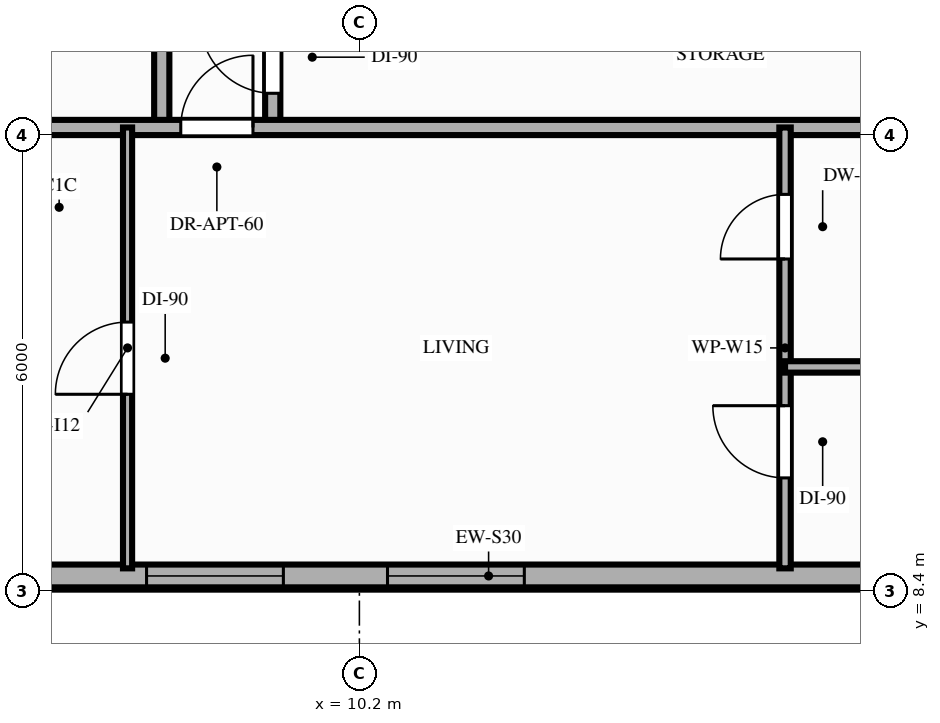
"""IFC4 building model, lengths in metres.
Left out: names, types, materials, properties, quantities, classifications, styles, units other than length and angle.
Written with IfcOpenShell. Run it as: python <this file> out.ifc"""

import sys

from ifc_helpers import new_model, si_unit, direction, frame, frame_2d, origin, place, context, subcontext, project, spatial, rectangle, extrude, element, fill, save


model = new_model("IFC4")
c1 = context("Model", 3, precision=1e-05, world=origin(), true_north=direction((0.0, 1.0)))
c2 = subcontext(c1, "Body", "Model", "MODEL_VIEW")
j1 = project(units=[si_unit("LENGTHUNIT", "METRE"), si_unit("PLANEANGLEUNIT", "RADIAN")], contexts=[c1])
p1 = place(None, origin())
s1 = spatial("IfcSite", under=j1, at=p1, CompositionType="ELEMENT")
p2 = place(p1, origin())
s2 = spatial("IfcBuilding", under=s1, at=p2, CompositionType="ELEMENT")
p3 = place(p2, frame((0.0, 0.0, 113.8)))
s3 = spatial("IfcBuildingStorey", under=s2, at=p3, CompositionType="ELEMENT", Elevation=113.8)
p4 = place(p3, frame((4.0, 8.6, 0.0), z_axis=(0.0, 0.0, 1.0), x_axis=(1.0, 0.0, 0.0)))
e1 = element("IfcWall", 1, at=p4, inside=s3, PredefinedType="STANDARD", context=c2, shape_type="SweptSolid", body=[
    extrude(rectangle(XDim=15.8, YDim=0.3, at=frame_2d((7.9, 0.0))), origin(), (0.0, 0.0, 1.0), 3.02),
])
p5 = place(p4, frame((6.57, 0.0, 0.85)))
e2 = element("IfcOpeningElement", 2, at=p5, cuts=e1, PredefinedType="OPENING", context=c2, shape_type="SweptSolid", body=[
    extrude(rectangle(XDim=1.8, YDim=1.75, at=frame_2d((0.9, 0.875))), frame((0.0, 0.16, 0.0), z_axis=(0.0, -1.0, 0.0), x_axis=(1.0, 0.0, 0.0)), (0.0, 0.0, 1.0), 0.32),
])
p6 = place(p4, frame((3.4, 0.0, 0.85)))
e3 = element("IfcOpeningElement", 3, at=p6, cuts=e1, PredefinedType="OPENING", context=c2, shape_type="SweptSolid", body=[
    extrude(rectangle(XDim=1.8, YDim=1.75, at=frame_2d((0.9, 0.875))), frame((0.0, 0.16, 0.0), z_axis=(0.0, -1.0, 0.0), x_axis=(1.0, 0.0, 0.0)), (0.0, 0.0, 1.0), 0.32),
])
p7 = place(p3, frame((7.6, 14.5, 0.0), z_axis=(0.0, 0.0, 1.0), x_axis=(0.0, 1.0, 0.0)))
e4 = element("IfcWall", 4, at=p7, inside=s3, PredefinedType="PARTITIONING", context=c2, shape_type="SweptSolid", body=[
    extrude(rectangle(XDim=13.6, YDim=0.2, at=frame_2d((6.8, 0.0))), origin(), (0.0, 0.0, 1.0), 2.4),
])
p8 = place(p7, frame((1.7, 0.0, 0.0)))
e5 = element("IfcOpeningElement", 5, at=p8, cuts=e4, PredefinedType="OPENING", context=c2, shape_type="SweptSolid", body=[
    extrude(rectangle(XDim=0.95, YDim=2.15, at=frame_2d((0.475, 1.075))), frame((0.0, 0.11, 0.0), z_axis=(0.0, -1.0, 0.0), x_axis=(1.0, 0.0, 0.0)), (0.0, 0.0, 1.0), 0.22),
])
p9 = place(p7, frame((6.66, 0.0, 0.0)))
e6 = element("IfcOpeningElement", 6, at=p9, cuts=e4, PredefinedType="OPENING", context=c2, shape_type="SweptSolid", body=[
    extrude(rectangle(XDim=0.95, YDim=2.15, at=frame_2d((0.475, 1.075))), frame((0.0, 0.11, 0.0), z_axis=(0.0, -1.0, 0.0), x_axis=(1.0, 0.0, 0.0)), (0.0, 0.0, 1.0), 0.22),
])
p10 = place(p7, frame((11.29, 0.0, 0.0)))
e7 = element("IfcOpeningElement", 7, at=p10, cuts=e4, PredefinedType="OPENING", context=c2, shape_type="SweptSolid", body=[
    extrude(rectangle(XDim=0.95, YDim=2.15, at=frame_2d((0.475, 1.075))), frame((0.0, 0.11, 0.0), z_axis=(0.0, -1.0, 0.0), x_axis=(1.0, 0.0, 0.0)), (0.0, 0.0, 1.0), 0.22),
])
p11 = place(p3, frame((9.06, 14.5, 0.0), z_axis=(0.0, 0.0, 1.0), x_axis=(0.0, 1.0, 0.0)))
e8 = element("IfcWall", 8, at=p11, inside=s3, PredefinedType="PARTITIONING", context=c2, shape_type="SweptSolid", body=[
    extrude(rectangle(XDim=13.6, YDim=0.2, at=frame_2d((6.8, 0.0))), origin(), (0.0, 0.0, 1.0), 2.4),
])
p12 = place(p11, frame((0.45, 0.0, 0.0)))
e9 = element("IfcOpeningElement", 9, at=p12, cuts=e8, PredefinedType="OPENING", context=c2, shape_type="SweptSolid", body=[
    extrude(rectangle(XDim=0.95, YDim=2.15, at=frame_2d((0.475, 1.075))), frame((0.0, 0.11, 0.0), z_axis=(0.0, -1.0, 0.0), x_axis=(1.0, 0.0, 0.0)), (0.0, 0.0, 1.0), 0.22),
])
p13 = place(p11, frame((2.08, 0.0, 0.0)))
e10 = element("IfcOpeningElement", 10, at=p13, cuts=e8, PredefinedType="OPENING", context=c2, shape_type="SweptSolid", body=[
    extrude(rectangle(XDim=0.95, YDim=2.1, at=frame_2d((0.475, 1.05))), frame((0.0, 0.11, 0.0), z_axis=(0.0, -1.0, 0.0), x_axis=(1.0, 0.0, 0.0)), (0.0, 0.0, 1.0), 0.22),
])
p14 = place(p11, frame((9.65, 0.0, 0.0)))
e11 = element("IfcOpeningElement", 11, at=p14, cuts=e8, PredefinedType="OPENING", context=c2, shape_type="SweptSolid", body=[
    extrude(rectangle(XDim=0.95, YDim=2.15, at=frame_2d((0.475, 1.075))), frame((0.0, 0.11, 0.0), z_axis=(0.0, -1.0, 0.0), x_axis=(1.0, 0.0, 0.0)), (0.0, 0.0, 1.0), 0.22),
])
p15 = place(p11, frame((5.43, 0.0, 0.0)))
e12 = element("IfcOpeningElement", 12, at=p15, cuts=e8, PredefinedType="OPENING", context=c2, shape_type="SweptSolid", body=[
    extrude(rectangle(XDim=0.95, YDim=2.15, at=frame_2d((0.475, 1.075))), frame((0.0, 0.11, 0.0), z_axis=(0.0, -1.0, 0.0), x_axis=(1.0, 0.0, 0.0)), (0.0, 0.0, 1.0), 0.22),
])
p16 = place(p3, frame((3.9, 14.5, 0.0), z_axis=(0.0, 0.0, 1.0), x_axis=(1.0, 0.0, 0.0)))
e13 = element("IfcWall", 13, at=p16, inside=s3, PredefinedType="PARTITIONING", context=c2, shape_type="SweptSolid", body=[
    extrude(rectangle(XDim=16.0, YDim=0.2, at=frame_2d((8.0, 0.0))), origin(), (0.0, 0.0, 1.0), 2.4),
])
p17 = place(p16, frame((3.95, 0.0, 0.0)))
e14 = element("IfcOpeningElement", 14, at=p17, cuts=e13, PredefinedType="OPENING", context=c2, shape_type="SweptSolid", body=[
    extrude(rectangle(XDim=0.95, YDim=2.15, at=frame_2d((0.475, 1.075))), frame((0.0, 0.11, 0.0), z_axis=(0.0, -1.0, 0.0), x_axis=(1.0, 0.0, 0.0)), (0.0, 0.0, 1.0), 0.22),
])
p18 = place(p3, frame((7.15, 8.7, 0.0), z_axis=(0.0, 0.0, 1.0), x_axis=(0.0, 1.0, 0.0)))
e15 = element("IfcWall", 15, at=p18, inside=s3, PredefinedType="PARTITIONING", context=c2, shape_type="SweptSolid", body=[
    extrude(rectangle(XDim=5.8, YDim=0.12, at=frame_2d((2.9, 0.0))), origin(), (0.0, 0.0, 1.0), 2.4),
])
p19 = place(p18, frame((2.29, 0.0, 0.0)))
e16 = element("IfcOpeningElement", 16, at=p19, cuts=e15, PredefinedType="OPENING", context=c2, shape_type="SweptSolid", body=[
    extrude(rectangle(XDim=0.95, YDim=2.15, at=frame_2d((0.475, 1.075))), frame((0.0, 0.07, 0.0), z_axis=(0.0, -1.0, 0.0), x_axis=(1.0, 0.0, 0.0)), (0.0, 0.0, 1.0), 0.14),
])
p20 = place(p3, frame((15.8, 8.7, 0.0), z_axis=(0.0, 0.0, 1.0), x_axis=(0.0, 1.0, 0.0)))
e17 = element("IfcWall", 17, at=p20, inside=s3, PredefinedType="PARTITIONING", context=c2, shape_type="SweptSolid", body=[
    extrude(rectangle(XDim=5.8, YDim=0.15, at=frame_2d((2.9, 0.0))), origin(), (0.0, 0.0, 1.0), 2.4),
])
p21 = place(p20, frame((1.19, 0.0, 0.0)))
e18 = element("IfcOpeningElement", 18, at=p21, cuts=e17, PredefinedType="OPENING", context=c2, shape_type="SweptSolid", body=[
    extrude(rectangle(XDim=0.95, YDim=2.15, at=frame_2d((0.475, 1.075))), frame((0.0, 0.085, 0.0), z_axis=(0.0, -1.0, 0.0), x_axis=(1.0, 0.0, 0.0)), (0.0, 0.0, 1.0), 0.17),
])
p22 = place(p20, frame((4.07, 0.0, 0.0)))
e19 = element("IfcOpeningElement", 19, at=p22, cuts=e17, PredefinedType="OPENING", context=c2, shape_type="SweptSolid", body=[
    extrude(rectangle(XDim=0.85, YDim=2.1, at=frame_2d((0.425, 1.05))), frame((0.0, 0.085, 0.0), z_axis=(0.0, -1.0, 0.0), x_axis=(1.0, 0.0, 0.0)), (0.0, 0.0, 1.0), 0.17),
])
p23 = place(p3, frame((15.8, 11.35, 0.0), z_axis=(0.0, 0.0, 1.0), x_axis=(1.0, 0.0, 0.0)))
e20 = element("IfcWall", 20, at=p23, inside=s3, PredefinedType="PARTITIONING", context=c2, shape_type="SweptSolid", body=[
    extrude(rectangle(XDim=4.1, YDim=0.15, at=frame_2d((2.05, 0.0))), origin(), (0.0, 0.0, 1.0), 3.02),
])
p24 = place(p5, origin())
e21 = element("IfcWindow", 21, at=p24, inside=s3, PartitioningType="SINGLE_PANEL", PredefinedType="WINDOW", context=c2, shape_type="SweptSolid", body=[
    extrude(rectangle(XDim=1.8, YDim=1.75, at=frame_2d((0.9, 0.875))), frame((0.0, 0.03, 0.0), z_axis=(0.0, -1.0, 0.0), x_axis=(1.0, 0.0, 0.0)), (0.0, 0.0, 1.0), 0.06),
])
fill(e2, e21)
p25 = place(p6, origin())
e22 = element("IfcWindow", 22, at=p25, inside=s3, PartitioningType="SINGLE_PANEL", PredefinedType="WINDOW", context=c2, shape_type="SweptSolid", body=[
    extrude(rectangle(XDim=1.8, YDim=1.75, at=frame_2d((0.9, 0.875))), frame((0.0, 0.03, 0.0), z_axis=(0.0, -1.0, 0.0), x_axis=(1.0, 0.0, 0.0)), (0.0, 0.0, 1.0), 0.06),
])
fill(e3, e22)
p26 = place(p17, origin())
e23 = element("IfcDoor", 23, at=p26, inside=s3, OperationType="SINGLE_SWING_RIGHT", PredefinedType="DOOR", context=c2, shape_type="SweptSolid", body=[
    extrude(rectangle(XDim=0.95, YDim=2.15, at=frame_2d((0.475, 1.075))), frame((0.0, 0.025, 0.0), z_axis=(0.0, -1.0, 0.0), x_axis=(1.0, 0.0, 0.0)), (0.0, 0.0, 1.0), 0.05),
])
fill(e14, e23)
p27 = place(p19, origin())
e24 = element("IfcDoor", 24, at=p27, inside=s3, OperationType="SINGLE_SWING_LEFT", PredefinedType="DOOR", context=c2, shape_type="SweptSolid", body=[
    extrude(rectangle(XDim=0.95, YDim=2.15, at=frame_2d((0.475, 1.075))), frame((0.0, 0.025, 0.0), z_axis=(0.0, -1.0, 0.0), x_axis=(1.0, 0.0, 0.0)), (0.0, 0.0, 1.0), 0.05),
])
fill(e16, e24)
p28 = place(p21, origin())
e25 = element("IfcDoor", 25, at=p28, inside=s3, OperationType="SINGLE_SWING_RIGHT", PredefinedType="DOOR", context=c2, shape_type="SweptSolid", body=[
    extrude(rectangle(XDim=0.95, YDim=2.15, at=frame_2d((0.475, 1.075))), frame((0.0, 0.025, 0.0), z_axis=(0.0, -1.0, 0.0), x_axis=(1.0, 0.0, 0.0)), (0.0, 0.0, 1.0), 0.05),
])
fill(e18, e25)
p29 = place(p22, origin())
e26 = element("IfcDoor", 26, at=p29, inside=s3, OperationType="SINGLE_SWING_LEFT", PredefinedType="DOOR", context=c2, shape_type="SweptSolid", body=[
    extrude(rectangle(XDim=0.85, YDim=2.1, at=frame_2d((0.425, 1.05))), frame((0.0, 0.025, 0.0), z_axis=(0.0, -1.0, 0.0), x_axis=(1.0, 0.0, 0.0)), (0.0, 0.0, 1.0), 0.05),
])
fill(e19, e26)
p30 = place(p12, origin())
e27 = element("IfcDoor", 27, at=p30, inside=s3, OperationType="SINGLE_SWING_RIGHT", PredefinedType="DOOR", context=c2, shape_type="SweptSolid", body=[
    extrude(rectangle(XDim=0.95, YDim=2.15, at=frame_2d((0.475, 1.075))), frame((0.0, 0.025, 0.0), z_axis=(0.0, -1.0, 0.0), x_axis=(1.0, 0.0, 0.0)), (0.0, 0.0, 1.0), 0.05),
])
fill(e9, e27)
save(model, sys.argv[1])
